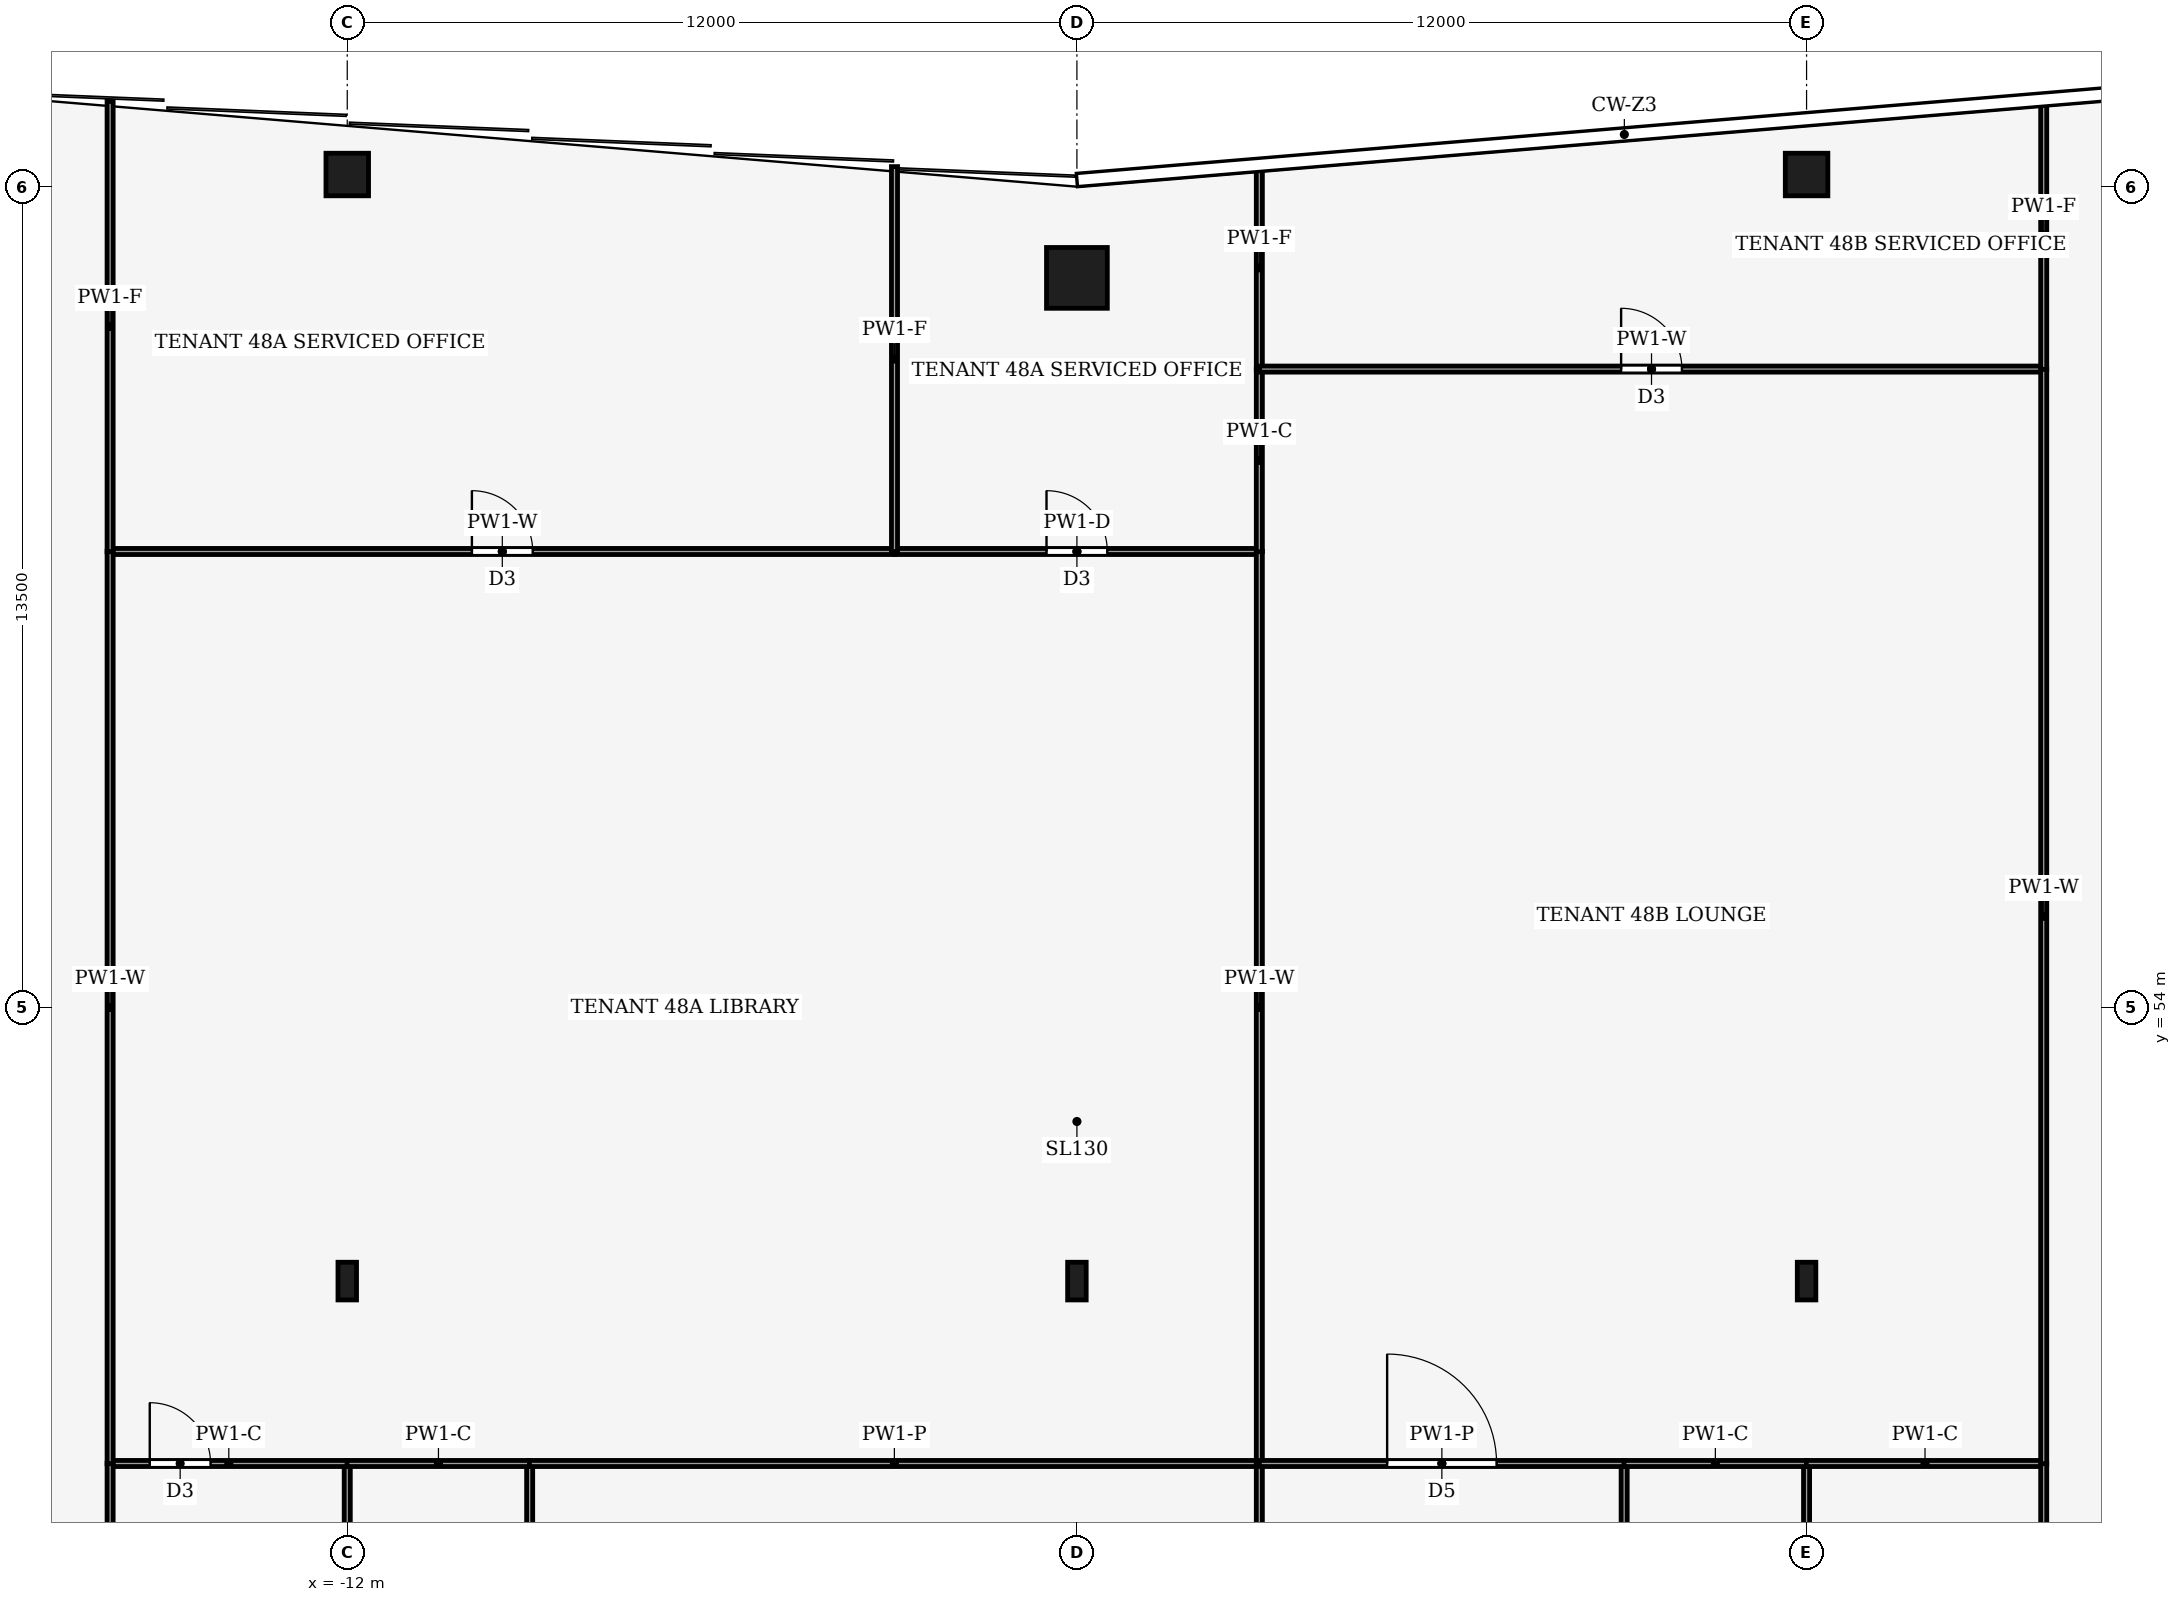
"""IFC4 building model, lengths in metres.
Left out: names, types, materials, properties, quantities, classifications, styles, units other than length and angle.
Written with IfcOpenShell. Run it as: python <this file> out.ifc"""

import sys

from ifc_helpers import new_model, si_unit, direction, frame, frame_2d, origin, origin_2d, place, context, subcontext, project, spatial, rectangle, hollow_rectangle, i_section, extrude, element, fill, save


model = new_model("IFC4")
c1 = context("Model", 3, precision=1e-05, world=origin(), true_north=direction((0.0, 1.0)))
c2 = subcontext(c1, "Body", "Model", "MODEL_VIEW")
j1 = project(units=[si_unit("LENGTHUNIT", "METRE"), si_unit("PLANEANGLEUNIT", "RADIAN")], contexts=[c1])
p1 = place(None, origin())
s1 = spatial("IfcSite", under=j1, at=p1, CompositionType="ELEMENT")
p2 = place(p1, origin())
s2 = spatial("IfcBuilding", under=s1, at=p2, CompositionType="ELEMENT")
p3 = place(p2, frame((0.0, 0.0, 210.0)))
s3 = spatial("IfcBuildingStorey", under=s2, at=p3, CompositionType="ELEMENT", Elevation=210.0)
p4 = place(p3, frame((0.0, 66.0, 0.0), z_axis=(0.0, 0.0, 1.0), x_axis=(1.0, 0.0, 0.0)))
e1 = element("IfcColumn", 1, at=p4, inside=s3, PredefinedType="COLUMN", context=c2, shape_type="SweptSolid", body=[
    extrude(hollow_rectangle(XDim=1.0, YDim=1.0, WallThickness=0.06, at=origin_2d()), origin(), (0.0, 0.0, 1.0), 4.0),
])
for number, where, z_axis, x_axis in (
    (2, (-12.0, 67.7, 0.0), (0.0, 0.0, 1.0), (1.0, 0.0, 0.0)),
    (3, (12.0, 67.7, 0.0), (0.0, 0.0, 1.0), (1.0, 0.0, 0.0)),
):
    element("IfcColumn", number, at=place(p3, frame(where, z_axis=z_axis, x_axis=x_axis)), inside=s3, PredefinedType="COLUMN", context=c2, shape_type="SweptSolid", body=[
        extrude(hollow_rectangle(XDim=0.7, YDim=0.7, WallThickness=0.03, at=origin_2d()), origin(), (0.0, 0.0, 1.0), 4.0),
    ])
for number, where, z_axis, x_axis in (
    (4, (-12.0, 49.5, 0.0), (0.0, 0.0, 1.0), (1.0, 0.0, 0.0)),
    (5, (0.0, 49.5, 0.0), (0.0, 0.0, 1.0), (1.0, 0.0, 0.0)),
    (6, (12.0, 49.5, 0.0), (0.0, 0.0, 1.0), (1.0, 0.0, 0.0)),
):
    element("IfcColumn", number, at=place(p3, frame(where, z_axis=z_axis, x_axis=x_axis)), inside=s3, PredefinedType="COLUMN", context=c2, shape_type="SweptSolid", body=[
        extrude(i_section(OverallWidth=0.305, OverallDepth=0.62, WebThickness=0.021, FlangeThickness=0.04, FilletRadius=0.027, at=origin_2d()), origin(), (0.0, 0.0, 1.0), 4.0),
    ])
p5 = place(p3, frame((-12.0, 46.5, 0.0), z_axis=(0.0, 0.0, 1.0), x_axis=(0.0, -1.0, 0.0)))
e7 = element("IfcWall", 7, at=p5, inside=s3, PredefinedType="PARTITIONING", context=c2, shape_type="SweptSolid", body=[
    extrude(rectangle(XDim=5.6, YDim=0.1, at=frame_2d((2.8, 0.0))), origin(), (0.0, 0.0, 1.0), 3.44),
])
p6 = place(p5, frame((2.3, 0.0, 0.0)))
e8 = element("IfcOpeningElement", 8, at=p6, cuts=e7, PredefinedType="OPENING", context=c2, shape_type="SweptSolid", body=[
    extrude(rectangle(XDim=1.0, YDim=2.1, at=frame_2d((0.5, 1.05))), frame((0.0, 0.06, 0.0), z_axis=(0.0, -1.0, 0.0), x_axis=(1.0, 0.0, 0.0)), (0.0, 0.0, 1.0), 0.12),
])
p7 = place(p3, frame((-15.9, 46.5, 0.0), z_axis=(0.0, 0.0, 1.0), x_axis=(1.0, 0.0, 0.0)))
e9 = element("IfcWall", 9, at=p7, inside=s3, PredefinedType="PARTITIONING", context=c2, shape_type="SweptSolid", body=[
    extrude(rectangle(XDim=3.904, YDim=0.1, at=frame_2d((1.952, 0.0))), origin(), (0.0, 0.0, 1.0), 3.87),
])
p8 = place(p7, frame((0.652, 0.0, 0.0)))
e10 = element("IfcOpeningElement", 10, at=p8, cuts=e9, PredefinedType="OPENING", context=c2, shape_type="SweptSolid", body=[
    extrude(rectangle(XDim=1.0, YDim=2.1, at=frame_2d((0.5, 1.05))), frame((0.0, 0.06, 0.0), z_axis=(0.0, -1.0, 0.0), x_axis=(1.0, 0.0, 0.0)), (0.0, 0.0, 1.0), 0.12),
])
p9 = place(p3, frame((-15.9, 46.504, 0.0), z_axis=(0.0, 0.0, 1.0), x_axis=(0.0, -1.0, 0.0)))
e11 = element("IfcWall", 11, at=p9, inside=s3, PredefinedType="PARTITIONING", context=c2, shape_type="SweptSolid", body=[
    extrude(rectangle(XDim=5.608, YDim=0.1, at=frame_2d((2.804, 0.0))), origin(), (0.0, 0.0, 1.0), 3.44),
])
p10 = place(p3, frame((-9.0, 40.9, 0.0), z_axis=(0.0, 0.0, 1.0), x_axis=(0.0, 1.0, 0.0)))
e12 = element("IfcWall", 12, at=p10, inside=s3, PredefinedType="PARTITIONING", context=c2, shape_type="SweptSolid", body=[
    extrude(rectangle(XDim=5.6, YDim=0.1, at=frame_2d((2.8, 0.0))), origin(), (0.0, 0.0, 1.0), 3.87),
])
p11 = place(p3, frame((-8.996, 46.5, 0.0), z_axis=(0.0, 0.0, 1.0), x_axis=(-1.0, 0.0, 0.0)))
e13 = element("IfcWall", 13, at=p11, inside=s3, PredefinedType="PARTITIONING", context=c2, shape_type="SweptSolid", body=[
    extrude(rectangle(XDim=3.008, YDim=0.1, at=frame_2d((1.504, 0.0))), origin(), (0.0, 0.0, 1.0), 3.87),
])
p12 = place(p3, frame((3.0, 46.5, 0.0), z_axis=(0.0, 0.0, 1.0), x_axis=(-1.0, 0.0, 0.0)))
e14 = element("IfcWall", 14, at=p12, inside=s3, PredefinedType="PARTITIONING", context=c2, shape_type="SweptSolid", body=[
    extrude(rectangle(XDim=12.004, YDim=0.1, at=frame_2d((6.002, 0.0))), origin(), (0.0, 0.0, 1.0), 3.44),
])
p13 = place(p3, frame((3.0, 40.9, 0.0), z_axis=(0.0, 0.0, 1.0), x_axis=(0.0, 1.0, 0.0)))
e15 = element("IfcWall", 15, at=p13, inside=s3, PredefinedType="PARTITIONING", context=c2, shape_type="SweptSolid", body=[
    extrude(rectangle(XDim=5.6, YDim=0.1, at=frame_2d((2.8, 0.0))), origin(), (0.0, 0.0, 1.0), 3.87),
])
p14 = place(p3, frame((-15.9, 61.5, 0.0), z_axis=(0.0, 0.0, 1.0), x_axis=(1.0, 0.0, 0.0)))
e16 = element("IfcWall", 16, at=p14, inside=s3, PredefinedType="PARTITIONING", context=c2, shape_type="SweptSolid", body=[
    extrude(rectangle(XDim=12.9, YDim=0.1, at=frame_2d((6.45, 0.0))), origin(), (0.0, 0.0, 1.0), 3.24),
])
p15 = place(p14, frame((5.95, 0.0, 0.0)))
e17 = element("IfcOpeningElement", 17, at=p15, cuts=e16, PredefinedType="OPENING", context=c2, shape_type="SweptSolid", body=[
    extrude(rectangle(XDim=1.0, YDim=2.1, at=frame_2d((0.5, 1.05))), frame((0.0, 0.06, 0.0), z_axis=(0.0, -1.0, 0.0), x_axis=(1.0, 0.0, 0.0)), (0.0, 0.0, 1.0), 0.12),
])
p16 = place(p3, frame((-3.0, 61.5, 0.0), z_axis=(0.0, 0.0, 1.0), x_axis=(1.0, 0.0, 0.0)))
e18 = element("IfcWall", 18, at=p16, inside=s3, PredefinedType="PARTITIONING", context=c2, shape_type="SweptSolid", body=[
    extrude(rectangle(XDim=6.0, YDim=0.1, at=frame_2d((3.0, 0.0))), origin(), (0.0, 0.0, 1.0), 3.29),
])
p17 = place(p16, frame((2.5, 0.0, 0.0)))
e19 = element("IfcOpeningElement", 19, at=p17, cuts=e18, PredefinedType="OPENING", context=c2, shape_type="SweptSolid", body=[
    extrude(rectangle(XDim=1.0, YDim=2.1, at=frame_2d((0.5, 1.05))), frame((0.0, 0.06, 0.0), z_axis=(0.0, -1.0, 0.0), x_axis=(1.0, 0.0, 0.0)), (0.0, 0.0, 1.0), 0.12),
])
p18 = place(p3, frame((3.0, 46.5, 0.0), z_axis=(0.0, 0.0, 1.0), x_axis=(0.0, 1.0, 0.0)))
e20 = element("IfcWall", 20, at=p18, inside=s3, PredefinedType="PARTITIONING", context=c2, shape_type="SweptSolid", body=[
    extrude(rectangle(XDim=15.004, YDim=0.1, at=frame_2d((7.502, 0.0))), origin(), (0.0, 0.0, 1.0), 3.24),
])
p19 = place(p3, frame((-15.9, 61.504, 0.0), z_axis=(0.0, 0.0, 1.0), x_axis=(0.0, -1.0, 0.0)))
e21 = element("IfcWall", 21, at=p19, inside=s3, PredefinedType="PARTITIONING", context=c2, shape_type="SweptSolid", body=[
    extrude(rectangle(XDim=15.008, YDim=0.1, at=frame_2d((7.504, 0.0))), origin(), (0.0, 0.0, 1.0), 3.24),
])
p20 = place(p3, frame((-3.0, 61.5, 0.0), z_axis=(0.0, 0.0, 1.0), x_axis=(0.0, 1.0, 0.0)))
e22 = element("IfcWall", 22, at=p20, inside=s3, PredefinedType="PARTITIONING", context=c2, shape_type="SweptSolid", body=[
    extrude(rectangle(XDim=6.33, YDim=0.1, at=frame_2d((3.165, 0.0))), origin(), (0.0, 0.0, 1.0), 3.04),
])
p21 = place(p3, frame((-15.9, 68.905, 0.0), z_axis=(0.0, 0.0, 1.0), x_axis=(0.0, -1.0, 0.0)))
e23 = element("IfcWall", 23, at=p21, inside=s3, PredefinedType="PARTITIONING", context=c2, shape_type="SweptSolid", body=[
    extrude(rectangle(XDim=7.409, YDim=0.1, at=frame_2d((3.705, 0.0))), origin(), (0.0, 0.0, 1.0), 3.04),
])
p22 = place(p3, frame((3.0, 61.496, 0.0), z_axis=(0.0, 0.0, 1.0), x_axis=(0.0, 1.0, 0.0)))
e24 = element("IfcWall", 24, at=p22, inside=s3, PredefinedType="PARTITIONING", context=c2, shape_type="SweptSolid", body=[
    extrude(rectangle(XDim=3.004, YDim=0.1, at=frame_2d((1.502, 0.0))), origin(), (0.0, 0.0, 1.0), 3.87),
])
p23 = place(p3, frame((3.0, 64.5, 0.0), z_axis=(0.0, 0.0, 1.0), x_axis=(0.0, 1.0, 0.0)))
e25 = element("IfcWall", 25, at=p23, inside=s3, PredefinedType="PARTITIONING", context=c2, shape_type="SweptSolid", body=[
    extrude(rectangle(XDim=3.33, YDim=0.1, at=frame_2d((1.665, 0.0))), origin(), (0.0, 0.0, 1.0), 3.04),
])
p24 = place(p3, frame((9.0, 46.5, 0.0), z_axis=(0.0, 0.0, 1.0), x_axis=(0.0, -1.0, 0.0)))
e26 = element("IfcWall", 26, at=p24, inside=s3, PredefinedType="PARTITIONING", context=c2, shape_type="SweptSolid", body=[
    extrude(rectangle(XDim=5.6, YDim=0.1, at=frame_2d((2.8, 0.0))), origin(), (0.0, 0.0, 1.0), 3.87),
])
p25 = place(p24, frame((2.3, 0.0, 0.0)))
e27 = element("IfcOpeningElement", 27, at=p25, cuts=e26, PredefinedType="OPENING", context=c2, shape_type="SweptSolid", body=[
    extrude(rectangle(XDim=1.0, YDim=2.1, at=frame_2d((0.5, 1.05))), frame((0.0, 0.06, 0.0), z_axis=(0.0, -1.0, 0.0), x_axis=(1.0, 0.0, 0.0)), (0.0, 0.0, 1.0), 0.12),
])
p26 = place(p3, frame((3.0, 46.5, 0.0), z_axis=(0.0, 0.0, 1.0), x_axis=(1.0, 0.0, 0.0)))
e28 = element("IfcWall", 28, at=p26, inside=s3, PredefinedType="PARTITIONING", context=c2, shape_type="SweptSolid", body=[
    extrude(rectangle(XDim=6.004, YDim=0.1, at=frame_2d((3.002, 0.0))), origin(), (0.0, 0.0, 1.0), 3.44),
])
p27 = place(p26, frame((2.102, 0.0, 0.0)))
e29 = element("IfcOpeningElement", 29, at=p27, cuts=e28, PredefinedType="OPENING", context=c2, shape_type="SweptSolid", body=[
    extrude(rectangle(XDim=1.8, YDim=2.1, at=frame_2d((0.9, 1.05))), frame((0.0, 0.06, 0.0), z_axis=(0.0, -1.0, 0.0), x_axis=(1.0, 0.0, 0.0)), (0.0, 0.0, 1.0), 0.12),
])
p28 = place(p3, frame((12.0, 40.9, 0.0), z_axis=(0.0, 0.0, 1.0), x_axis=(0.0, 1.0, 0.0)))
e30 = element("IfcWall", 30, at=p28, inside=s3, PredefinedType="PARTITIONING", context=c2, shape_type="SweptSolid", body=[
    extrude(rectangle(XDim=5.6, YDim=0.1, at=frame_2d((2.8, 0.0))), origin(), (0.0, 0.0, 1.0), 3.44),
])
p29 = place(p3, frame((12.004, 46.5, 0.0), z_axis=(0.0, 0.0, 1.0), x_axis=(-1.0, 0.0, 0.0)))
e31 = element("IfcWall", 31, at=p29, inside=s3, PredefinedType="PARTITIONING", context=c2, shape_type="SweptSolid", body=[
    extrude(rectangle(XDim=3.008, YDim=0.1, at=frame_2d((1.504, 0.0))), origin(), (0.0, 0.0, 1.0), 3.87),
])
p30 = place(p3, frame((15.9, 46.5, 0.0), z_axis=(0.0, 0.0, 1.0), x_axis=(-1.0, 0.0, 0.0)))
e32 = element("IfcWall", 32, at=p30, inside=s3, PredefinedType="PARTITIONING", context=c2, shape_type="SweptSolid", body=[
    extrude(rectangle(XDim=3.904, YDim=0.1, at=frame_2d((1.952, 0.0))), origin(), (0.0, 0.0, 1.0), 3.87),
])
p31 = place(p3, frame((15.9, 40.896, 0.0), z_axis=(0.0, 0.0, 1.0), x_axis=(0.0, 1.0, 0.0)))
e33 = element("IfcWall", 33, at=p31, inside=s3, PredefinedType="PARTITIONING", context=c2, shape_type="SweptSolid", body=[
    extrude(rectangle(XDim=5.608, YDim=0.1, at=frame_2d((2.804, 0.0))), origin(), (0.0, 0.0, 1.0), 3.44),
])
p32 = place(p3, frame((3.0, 64.5, 0.0), z_axis=(0.0, 0.0, 1.0), x_axis=(1.0, 0.0, 0.0)))
e34 = element("IfcWall", 34, at=p32, inside=s3, PredefinedType="PARTITIONING", context=c2, shape_type="SweptSolid", body=[
    extrude(rectangle(XDim=12.9, YDim=0.1, at=frame_2d((6.45, 0.0))), origin(), (0.0, 0.0, 1.0), 3.24),
])
p33 = place(p32, frame((5.95, 0.0, 0.0)))
e35 = element("IfcOpeningElement", 35, at=p33, cuts=e34, PredefinedType="OPENING", context=c2, shape_type="SweptSolid", body=[
    extrude(rectangle(XDim=1.0, YDim=2.1, at=frame_2d((0.5, 1.05))), frame((0.0, 0.06, 0.0), z_axis=(0.0, -1.0, 0.0), x_axis=(1.0, 0.0, 0.0)), (0.0, 0.0, 1.0), 0.12),
])
p34 = place(p3, frame((15.9, 46.496, 0.0), z_axis=(0.0, 0.0, 1.0), x_axis=(0.0, 1.0, 0.0)))
e36 = element("IfcWall", 36, at=p34, inside=s3, PredefinedType="PARTITIONING", context=c2, shape_type="SweptSolid", body=[
    extrude(rectangle(XDim=18.008, YDim=0.1, at=frame_2d((9.004, 0.0))), origin(), (0.0, 0.0, 1.0), 3.24),
])
p35 = place(p3, frame((15.9, 64.496, 0.0), z_axis=(0.0, 0.0, 1.0), x_axis=(0.0, 1.0, 0.0)))
e37 = element("IfcWall", 37, at=p35, inside=s3, PredefinedType="PARTITIONING", context=c2, shape_type="SweptSolid", body=[
    extrude(rectangle(XDim=4.409, YDim=0.1, at=frame_2d((2.205, 0.0))), origin(), (0.0, 0.0, 1.0), 3.04),
])
p36 = place(p8, origin())
e38 = element("IfcDoor", 38, at=p36, inside=s3, OperationType="SINGLE_SWING_LEFT", PredefinedType="DOOR", context=c2, shape_type="SweptSolid", body=[
    extrude(rectangle(XDim=1.0, YDim=2.1, at=frame_2d((0.5, 1.05))), frame((0.0, 0.025, 0.0), z_axis=(0.0, -1.0, 0.0), x_axis=(1.0, 0.0, 0.0)), (0.0, 0.0, 1.0), 0.05),
])
fill(e10, e38)
p37 = place(p15, origin())
e39 = element("IfcDoor", 39, at=p37, inside=s3, OperationType="SINGLE_SWING_RIGHT", PredefinedType="DOOR", context=c2, shape_type="SweptSolid", body=[
    extrude(rectangle(XDim=1.0, YDim=2.1, at=frame_2d((0.5, 1.05))), frame((0.0, 0.025, 0.0), z_axis=(0.0, -1.0, 0.0), x_axis=(1.0, 0.0, 0.0)), (0.0, 0.0, 1.0), 0.05),
])
fill(e17, e39)
p38 = place(p17, origin())
e40 = element("IfcDoor", 40, at=p38, inside=s3, OperationType="SINGLE_SWING_LEFT", PredefinedType="DOOR", context=c2, shape_type="SweptSolid", body=[
    extrude(rectangle(XDim=1.0, YDim=2.1, at=frame_2d((0.5, 1.05))), frame((0.0, 0.025, 0.0), z_axis=(0.0, -1.0, 0.0), x_axis=(1.0, 0.0, 0.0)), (0.0, 0.0, 1.0), 0.05),
])
fill(e19, e40)
p39 = place(p27, origin())
e41 = element("IfcDoor", 41, at=p39, inside=s3, OperationType="DOUBLE_DOOR_SINGLE_SWING", PredefinedType="DOOR", context=c2, shape_type="SweptSolid", body=[
    extrude(rectangle(XDim=1.8, YDim=2.1, at=frame_2d((0.9, 1.05))), frame((0.0, 0.025, 0.0), z_axis=(0.0, -1.0, 0.0), x_axis=(1.0, 0.0, 0.0)), (0.0, 0.0, 1.0), 0.05),
])
fill(e29, e41)
p40 = place(p33, origin())
e42 = element("IfcDoor", 42, at=p40, inside=s3, OperationType="SINGLE_SWING_RIGHT", PredefinedType="DOOR", context=c2, shape_type="SweptSolid", body=[
    extrude(rectangle(XDim=1.0, YDim=2.1, at=frame_2d((0.5, 1.05))), frame((0.0, 0.025, 0.0), z_axis=(0.0, -1.0, 0.0), x_axis=(1.0, 0.0, 0.0)), (0.0, 0.0, 1.0), 0.05),
])
fill(e35, e42)
save(model, sys.argv[1])
